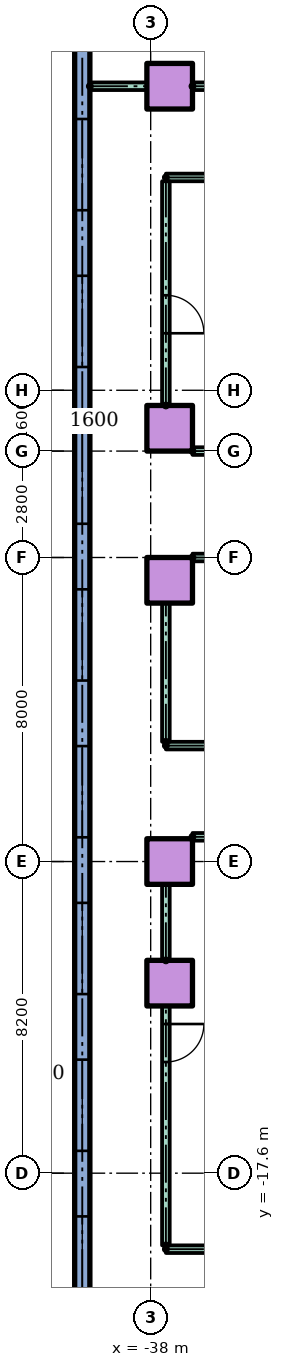
"""IFC4 building model, lengths in metres.
Left out: names, types, materials, properties, quantities, classifications, styles, units other than length and angle.
Written with IfcOpenShell. Run it as: python <this file> out.ifc"""

import sys

from ifc_helpers import new_model, si_unit, direction, frame, frame_2d, origin, origin_2d, place, context, subcontext, project, spatial, rectangle, hollow_rectangle, extrude, element, fill, save


model = new_model("IFC4")
c1 = context("Model", 3, precision=1e-05, world=origin(), true_north=direction((0.0, 1.0)))
c2 = subcontext(c1, "Body", "Model", "MODEL_VIEW")
j1 = project(units=[si_unit("LENGTHUNIT", "METRE"), si_unit("PLANEANGLEUNIT", "RADIAN")], contexts=[c1])
p1 = place(None, origin())
s1 = spatial("IfcSite", under=j1, at=p1, CompositionType="ELEMENT")
p2 = place(p1, origin())
s2 = spatial("IfcBuilding", under=s1, at=p2, CompositionType="ELEMENT")
p3 = place(p2, frame((0.0, 0.0, 6.0)))
s3 = spatial("IfcBuildingStorey", under=s2, at=p3, CompositionType="ELEMENT", Elevation=6.0)
for number, where in (
    (1, (-37.5, -12.6, 0.0)),
    (2, (-37.5, -9.4, 0.0)),
    (3, (-37.5, -2.0, 0.0)),
    (4, (-37.5, 2.0, 0.0)),
    (5, (-37.5, 11.0, 0.0)),
):
    element("IfcColumn", number, at=place(p3, frame(where)), inside=s3, PredefinedType="COLUMN", context=c2, shape_type="SweptSolid", body=[
        extrude(hollow_rectangle(XDim=1.2, YDim=1.2, WallThickness=0.06, at=origin_2d()), origin(), (0.0, 0.0, 1.0), 4.0),
    ])
p4 = place(p3, frame((-39.8, 20.0, 0.0), z_axis=(0.0, 0.0, 1.0), x_axis=(0.0, -1.0, 0.0)))
e6 = element("IfcWall", 6, at=p4, inside=s3, PredefinedType="STANDARD", context=c2, shape_type="SweptSolid", body=[
    extrude(rectangle(XDim=70.0, YDim=0.4, at=frame_2d((35.0, 0.0))), origin(), (0.0, 0.0, 1.0), 3.7),
])
p5 = place(p4, frame((1.05, 0.0, 0.9)))
e7 = element("IfcOpeningElement", 7, at=p5, cuts=e6, PredefinedType="OPENING", context=c2, shape_type="SweptSolid", body=[
    extrude(rectangle(XDim=2.4, YDim=2.1, at=frame_2d((1.2, 1.05))), frame((0.0, 0.21, 0.0), z_axis=(0.0, -1.0, 0.0), x_axis=(1.0, 0.0, 0.0)), (0.0, 0.0, 1.0), 0.42),
])
p6 = place(p4, frame((5.55, 0.0, 0.9)))
e8 = element("IfcOpeningElement", 8, at=p6, cuts=e6, PredefinedType="OPENING", context=c2, shape_type="SweptSolid", body=[
    extrude(rectangle(XDim=2.4, YDim=2.1, at=frame_2d((1.2, 1.05))), frame((0.0, 0.21, 0.0), z_axis=(0.0, -1.0, 0.0), x_axis=(1.0, 0.0, 0.0)), (0.0, 0.0, 1.0), 0.42),
])
p7 = place(p4, frame((9.863, 0.0, 0.9)))
e9 = element("IfcOpeningElement", 9, at=p7, cuts=e6, PredefinedType="OPENING", context=c2, shape_type="SweptSolid", body=[
    extrude(rectangle(XDim=2.4, YDim=2.1, at=frame_2d((1.2, 1.05))), frame((0.0, 0.21, 0.0), z_axis=(0.0, -1.0, 0.0), x_axis=(1.0, 0.0, 0.0)), (0.0, 0.0, 1.0), 0.42),
])
p8 = place(p4, frame((13.988, 0.0, 0.9)))
e10 = element("IfcOpeningElement", 10, at=p8, cuts=e6, PredefinedType="OPENING", context=c2, shape_type="SweptSolid", body=[
    extrude(rectangle(XDim=2.4, YDim=2.1, at=frame_2d((1.2, 1.05))), frame((0.0, 0.21, 0.0), z_axis=(0.0, -1.0, 0.0), x_axis=(1.0, 0.0, 0.0)), (0.0, 0.0, 1.0), 0.42),
])
p9 = place(p4, frame((18.113, 0.0, 0.9)))
e11 = element("IfcOpeningElement", 11, at=p9, cuts=e6, PredefinedType="OPENING", context=c2, shape_type="SweptSolid", body=[
    extrude(rectangle(XDim=2.4, YDim=2.1, at=frame_2d((1.2, 1.05))), frame((0.0, 0.21, 0.0), z_axis=(0.0, -1.0, 0.0), x_axis=(1.0, 0.0, 0.0)), (0.0, 0.0, 1.0), 0.42),
])
p10 = place(p4, frame((22.238, 0.0, 0.9)))
e12 = element("IfcOpeningElement", 12, at=p10, cuts=e6, PredefinedType="OPENING", context=c2, shape_type="SweptSolid", body=[
    extrude(rectangle(XDim=2.4, YDim=2.1, at=frame_2d((1.2, 1.05))), frame((0.0, 0.21, 0.0), z_axis=(0.0, -1.0, 0.0), x_axis=(1.0, 0.0, 0.0)), (0.0, 0.0, 1.0), 0.42),
])
p11 = place(p4, frame((26.363, 0.0, 0.9)))
e13 = element("IfcOpeningElement", 13, at=p11, cuts=e6, PredefinedType="OPENING", context=c2, shape_type="SweptSolid", body=[
    extrude(rectangle(XDim=2.4, YDim=2.1, at=frame_2d((1.2, 1.05))), frame((0.0, 0.21, 0.0), z_axis=(0.0, -1.0, 0.0), x_axis=(1.0, 0.0, 0.0)), (0.0, 0.0, 1.0), 0.42),
])
p12 = place(p4, frame((30.488, 0.0, 0.9)))
e14 = element("IfcOpeningElement", 14, at=p12, cuts=e6, PredefinedType="OPENING", context=c2, shape_type="SweptSolid", body=[
    extrude(rectangle(XDim=2.4, YDim=2.1, at=frame_2d((1.2, 1.05))), frame((0.0, 0.21, 0.0), z_axis=(0.0, -1.0, 0.0), x_axis=(1.0, 0.0, 0.0)), (0.0, 0.0, 1.0), 0.42),
])
p13 = place(p4, frame((34.613, 0.0, 0.9)))
e15 = element("IfcOpeningElement", 15, at=p13, cuts=e6, PredefinedType="OPENING", context=c2, shape_type="SweptSolid", body=[
    extrude(rectangle(XDim=2.4, YDim=2.1, at=frame_2d((1.2, 1.05))), frame((0.0, 0.21, 0.0), z_axis=(0.0, -1.0, 0.0), x_axis=(1.0, 0.0, 0.0)), (0.0, 0.0, 1.0), 0.42),
])
p14 = place(p4, frame((38.738, 0.0, 0.9)))
e16 = element("IfcOpeningElement", 16, at=p14, cuts=e6, PredefinedType="OPENING", context=c2, shape_type="SweptSolid", body=[
    extrude(rectangle(XDim=2.4, YDim=2.1, at=frame_2d((1.2, 1.05))), frame((0.0, 0.21, 0.0), z_axis=(0.0, -1.0, 0.0), x_axis=(1.0, 0.0, 0.0)), (0.0, 0.0, 1.0), 0.42),
])
p15 = place(p4, frame((53.633, 0.0, 0.9)))
e17 = element("IfcOpeningElement", 17, at=p15, cuts=e6, PredefinedType="OPENING", context=c2, shape_type="SweptSolid", body=[
    extrude(rectangle(XDim=2.4, YDim=2.1, at=frame_2d((1.2, 1.05))), frame((0.0, 0.21, 0.0), z_axis=(0.0, -1.0, 0.0), x_axis=(1.0, 0.0, 0.0)), (0.0, 0.0, 1.0), 0.42),
])
p16 = place(p4, frame((57.3, 0.0, 0.9)))
e18 = element("IfcOpeningElement", 18, at=p16, cuts=e6, PredefinedType="OPENING", context=c2, shape_type="SweptSolid", body=[
    extrude(rectangle(XDim=2.4, YDim=2.1, at=frame_2d((1.2, 1.05))), frame((0.0, 0.21, 0.0), z_axis=(0.0, -1.0, 0.0), x_axis=(1.0, 0.0, 0.0)), (0.0, 0.0, 1.0), 0.42),
])
p17 = place(p4, frame((60.967, 0.0, 0.9)))
e19 = element("IfcOpeningElement", 19, at=p17, cuts=e6, PredefinedType="OPENING", context=c2, shape_type="SweptSolid", body=[
    extrude(rectangle(XDim=2.4, YDim=2.1, at=frame_2d((1.2, 1.05))), frame((0.0, 0.21, 0.0), z_axis=(0.0, -1.0, 0.0), x_axis=(1.0, 0.0, 0.0)), (0.0, 0.0, 1.0), 0.42),
])
p18 = place(p4, frame((66.85, 0.0, 0.9)))
e20 = element("IfcOpeningElement", 20, at=p18, cuts=e6, PredefinedType="OPENING", context=c2, shape_type="SweptSolid", body=[
    extrude(rectangle(XDim=2.4, YDim=2.1, at=frame_2d((1.2, 1.05))), frame((0.0, 0.21, 0.0), z_axis=(0.0, -1.0, 0.0), x_axis=(1.0, 0.0, 0.0)), (0.0, 0.0, 1.0), 0.42),
])
p19 = place(p3, frame((-37.6, -19.6, 0.0)))
e21 = element("IfcWall", 21, at=p19, inside=s3, PredefinedType="PARTITIONING", context=c2, shape_type="SweptSolid", body=[
    extrude(rectangle(XDim=75.2, YDim=0.2, at=frame_2d((37.6, 0.0))), origin(), (0.0, 0.0, 1.0), 3.7),
])
p20 = place(p19, frame((14.5, 0.0, 0.0)))
e22 = element("IfcOpeningElement", 22, at=p20, cuts=e21, PredefinedType="OPENING", context=c2, shape_type="SweptSolid", body=[
    extrude(rectangle(XDim=1.0, YDim=2.1, at=frame_2d((0.5, 1.05))), frame((0.0, 0.11, 0.0), z_axis=(0.0, -1.0, 0.0), x_axis=(1.0, 0.0, 0.0)), (0.0, 0.0, 1.0), 0.22),
])
p21 = place(p19, frame((22.184, 0.0, 0.0)))
e23 = element("IfcOpeningElement", 23, at=p21, cuts=e21, PredefinedType="OPENING", context=c2, shape_type="SweptSolid", body=[
    extrude(rectangle(XDim=1.0, YDim=2.1, at=frame_2d((0.5, 1.05))), frame((0.0, 0.11, 0.0), z_axis=(0.0, -1.0, 0.0), x_axis=(1.0, 0.0, 0.0)), (0.0, 0.0, 1.0), 0.22),
])
p22 = place(p19, frame((29.016, 0.0, 0.0)))
e24 = element("IfcOpeningElement", 24, at=p22, cuts=e21, PredefinedType="OPENING", context=c2, shape_type="SweptSolid", body=[
    extrude(rectangle(XDim=1.0, YDim=2.1, at=frame_2d((0.5, 1.05))), frame((0.0, 0.11, 0.0), z_axis=(0.0, -1.0, 0.0), x_axis=(1.0, 0.0, 0.0)), (0.0, 0.0, 1.0), 0.22),
])
p23 = place(p19, frame((34.34, 0.0, 0.0)))
e25 = element("IfcOpeningElement", 25, at=p23, cuts=e21, PredefinedType="OPENING", context=c2, shape_type="SweptSolid", body=[
    extrude(rectangle(XDim=1.0, YDim=2.1, at=frame_2d((0.5, 1.05))), frame((0.0, 0.11, 0.0), z_axis=(0.0, -1.0, 0.0), x_axis=(1.0, 0.0, 0.0)), (0.0, 0.0, 1.0), 0.22),
])
p24 = place(p19, frame((41.06, 0.0, 0.0)))
e26 = element("IfcOpeningElement", 26, at=p24, cuts=e21, PredefinedType="OPENING", context=c2, shape_type="SweptSolid", body=[
    extrude(rectangle(XDim=1.0, YDim=2.1, at=frame_2d((0.5, 1.05))), frame((0.0, 0.11, 0.0), z_axis=(0.0, -1.0, 0.0), x_axis=(1.0, 0.0, 0.0)), (0.0, 0.0, 1.0), 0.22),
])
p25 = place(p19, frame((46.95, 0.0, 0.0)))
e27 = element("IfcOpeningElement", 27, at=p25, cuts=e21, PredefinedType="OPENING", context=c2, shape_type="SweptSolid", body=[
    extrude(rectangle(XDim=1.1, YDim=2.1, at=frame_2d((0.55, 1.05))), frame((0.0, 0.11, 0.0), z_axis=(0.0, -1.0, 0.0), x_axis=(1.0, 0.0, 0.0)), (0.0, 0.0, 1.0), 0.22),
])
p26 = place(p19, frame((55.35, 0.0, 0.0)))
e28 = element("IfcOpeningElement", 28, at=p26, cuts=e21, PredefinedType="OPENING", context=c2, shape_type="SweptSolid", body=[
    extrude(rectangle(XDim=1.1, YDim=2.1, at=frame_2d((0.55, 1.05))), frame((0.0, 0.11, 0.0), z_axis=(0.0, -1.0, 0.0), x_axis=(1.0, 0.0, 0.0)), (0.0, 0.0, 1.0), 0.22),
])
p27 = place(p19, frame((62.7, 0.0, 0.0)))
e29 = element("IfcOpeningElement", 29, at=p27, cuts=e21, PredefinedType="OPENING", context=c2, shape_type="SweptSolid", body=[
    extrude(rectangle(XDim=1.0, YDim=2.1, at=frame_2d((0.5, 1.05))), frame((0.0, 0.11, 0.0), z_axis=(0.0, -1.0, 0.0), x_axis=(1.0, 0.0, 0.0)), (0.0, 0.0, 1.0), 0.22),
])
p28 = place(p3, frame((-36.9, -8.75, 0.0)))
e30 = element("IfcWall", 30, at=p28, inside=s3, PredefinedType="PARTITIONING", context=c2, shape_type="SweptSolid", body=[
    extrude(rectangle(XDim=73.8, YDim=0.2, at=frame_2d((36.9, 0.0))), origin(), (0.0, 0.0, 1.0), 3.7),
])
p29 = place(p3, frame((-37.6, -6.35, 0.0)))
e31 = element("IfcWall", 31, at=p29, inside=s3, PredefinedType="PARTITIONING", context=c2, shape_type="SweptSolid", body=[
    extrude(rectangle(XDim=75.2, YDim=0.2, at=frame_2d((37.6, 0.0))), origin(), (0.0, 0.0, 1.0), 3.7),
])
p30 = place(p29, frame((4.0, 0.0, 0.0)))
e32 = element("IfcOpeningElement", 32, at=p30, cuts=e31, PredefinedType="OPENING", context=c2, shape_type="SweptSolid", body=[
    extrude(rectangle(XDim=1.0, YDim=2.1, at=frame_2d((0.5, 1.05))), frame((0.0, 0.11, 0.0), z_axis=(0.0, -1.0, 0.0), x_axis=(1.0, 0.0, 0.0)), (0.0, 0.0, 1.0), 0.22),
])
p31 = place(p29, frame((13.0, 0.0, 0.0)))
e33 = element("IfcOpeningElement", 33, at=p31, cuts=e31, PredefinedType="OPENING", context=c2, shape_type="SweptSolid", body=[
    extrude(rectangle(XDim=1.0, YDim=2.1, at=frame_2d((0.5, 1.05))), frame((0.0, 0.11, 0.0), z_axis=(0.0, -1.0, 0.0), x_axis=(1.0, 0.0, 0.0)), (0.0, 0.0, 1.0), 0.22),
])
p32 = place(p29, frame((21.55, 0.0, 0.0)))
e34 = element("IfcOpeningElement", 34, at=p32, cuts=e31, PredefinedType="OPENING", context=c2, shape_type="SweptSolid", body=[
    extrude(rectangle(XDim=0.9, YDim=2.1, at=frame_2d((0.45, 1.05))), frame((0.0, 0.11, 0.0), z_axis=(0.0, -1.0, 0.0), x_axis=(1.0, 0.0, 0.0)), (0.0, 0.0, 1.0), 0.22),
])
p33 = place(p29, frame((31.5, 0.0, 0.0)))
e35 = element("IfcOpeningElement", 35, at=p33, cuts=e31, PredefinedType="OPENING", context=c2, shape_type="SweptSolid", body=[
    extrude(rectangle(XDim=1.0, YDim=2.1, at=frame_2d((0.5, 1.05))), frame((0.0, 0.11, 0.0), z_axis=(0.0, -1.0, 0.0), x_axis=(1.0, 0.0, 0.0)), (0.0, 0.0, 1.0), 0.22),
])
p34 = place(p29, frame((43.5, 0.0, 0.0)))
e36 = element("IfcOpeningElement", 36, at=p34, cuts=e31, PredefinedType="OPENING", context=c2, shape_type="SweptSolid", body=[
    extrude(rectangle(XDim=1.0, YDim=2.1, at=frame_2d((0.5, 1.05))), frame((0.0, 0.11, 0.0), z_axis=(0.0, -1.0, 0.0), x_axis=(1.0, 0.0, 0.0)), (0.0, 0.0, 1.0), 0.22),
])
p35 = place(p29, frame((62.1, 0.0, 0.0)))
e37 = element("IfcOpeningElement", 37, at=p35, cuts=e31, PredefinedType="OPENING", context=c2, shape_type="SweptSolid", body=[
    extrude(rectangle(XDim=1.0, YDim=2.1, at=frame_2d((0.5, 1.05))), frame((0.0, 0.11, 0.0), z_axis=(0.0, -1.0, 0.0), x_axis=(1.0, 0.0, 0.0)), (0.0, 0.0, 1.0), 0.22),
])
p36 = place(p3, frame((-36.9, -1.4, 0.0)))
e38 = element("IfcWall", 38, at=p36, inside=s3, PredefinedType="PARTITIONING", context=c2, shape_type="SweptSolid", body=[
    extrude(rectangle(XDim=22.9, YDim=0.2, at=frame_2d((11.45, 0.0))), origin(), (0.0, 0.0, 1.0), 3.7),
])
p37 = place(p3, frame((-36.9, 1.4, 0.0)))
e39 = element("IfcWall", 39, at=p37, inside=s3, PredefinedType="PARTITIONING", context=c2, shape_type="SweptSolid", body=[
    extrude(rectangle(XDim=20.6, YDim=0.2, at=frame_2d((10.3, 0.0))), origin(), (0.0, 0.0, 1.0), 3.7),
])
p38 = place(p37, frame((7.9, 0.0, 0.0)))
e40 = element("IfcOpeningElement", 40, at=p38, cuts=e39, PredefinedType="OPENING", context=c2, shape_type="SweptSolid", body=[
    extrude(rectangle(XDim=1.0, YDim=2.1, at=frame_2d((0.5, 1.05))), frame((0.0, 0.11, 0.0), z_axis=(0.0, -1.0, 0.0), x_axis=(1.0, 0.0, 0.0)), (0.0, 0.0, 1.0), 0.22),
])
p39 = place(p37, frame((12.9, 0.0, 0.0)))
e41 = element("IfcOpeningElement", 41, at=p39, cuts=e39, PredefinedType="OPENING", context=c2, shape_type="SweptSolid", body=[
    extrude(rectangle(XDim=1.0, YDim=2.1, at=frame_2d((0.5, 1.05))), frame((0.0, 0.11, 0.0), z_axis=(0.0, -1.0, 0.0), x_axis=(1.0, 0.0, 0.0)), (0.0, 0.0, 1.0), 0.22),
])
p40 = place(p37, frame((16.6, 0.0, 0.0)))
e42 = element("IfcOpeningElement", 42, at=p40, cuts=e39, PredefinedType="OPENING", context=c2, shape_type="SweptSolid", body=[
    extrude(rectangle(XDim=1.0, YDim=2.1, at=frame_2d((0.5, 1.05))), frame((0.0, 0.11, 0.0), z_axis=(0.0, -1.0, 0.0), x_axis=(1.0, 0.0, 0.0)), (0.0, 0.0, 1.0), 0.22),
])
p41 = place(p37, frame((18.95, 0.0, 0.0)))
e43 = element("IfcOpeningElement", 43, at=p41, cuts=e39, PredefinedType="OPENING", context=c2, shape_type="SweptSolid", body=[
    extrude(rectangle(XDim=0.9, YDim=2.1, at=frame_2d((0.45, 1.05))), frame((0.0, 0.11, 0.0), z_axis=(0.0, -1.0, 0.0), x_axis=(1.0, 0.0, 0.0)), (0.0, 0.0, 1.0), 0.22),
])
p42 = place(p3, frame((-37.6, 8.6, 0.0)))
e44 = element("IfcWall", 44, at=p42, inside=s3, PredefinedType="PARTITIONING", context=c2, shape_type="SweptSolid", body=[
    extrude(rectangle(XDim=21.3, YDim=0.2, at=frame_2d((10.65, 0.0))), origin(), (0.0, 0.0, 1.0), 3.7),
])
p43 = place(p3, frame((-39.6, 11.0, 0.0)))
e45 = element("IfcWall", 45, at=p43, inside=s3, PredefinedType="PARTITIONING", context=c2, shape_type="SweptSolid", body=[
    extrude(rectangle(XDim=1.5, YDim=0.2, at=frame_2d((0.75, 0.0))), origin(), (0.0, 0.0, 1.0), 3.7),
])
p44 = place(p3, frame((-36.9, 11.0, 0.0)))
e46 = element("IfcWall", 46, at=p44, inside=s3, PredefinedType="PARTITIONING", context=c2, shape_type="SweptSolid", body=[
    extrude(rectangle(XDim=6.4, YDim=0.2, at=frame_2d((3.2, 0.0))), origin(), (0.0, 0.0, 1.0), 3.7),
])
p45 = place(p44, frame((1.792, 0.0, 0.0)))
e47 = element("IfcOpeningElement", 47, at=p45, cuts=e46, PredefinedType="OPENING", context=c2, shape_type="SweptSolid", body=[
    extrude(rectangle(XDim=1.0, YDim=2.1, at=frame_2d((0.5, 1.05))), frame((0.0, 0.11, 0.0), z_axis=(0.0, -1.0, 0.0), x_axis=(1.0, 0.0, 0.0)), (0.0, 0.0, 1.0), 0.22),
])
p46 = place(p44, frame((5.05, 0.0, 0.0)))
e48 = element("IfcOpeningElement", 48, at=p46, cuts=e46, PredefinedType="OPENING", context=c2, shape_type="SweptSolid", body=[
    extrude(rectangle(XDim=1.0, YDim=2.1, at=frame_2d((0.5, 1.05))), frame((0.0, 0.11, 0.0), z_axis=(0.0, -1.0, 0.0), x_axis=(1.0, 0.0, 0.0)), (0.0, 0.0, 1.0), 0.22),
])
p47 = place(p3, frame((-37.6, -19.5, 0.0), z_axis=(0.0, 0.0, 1.0), x_axis=(0.0, 1.0, 0.0)))
e49 = element("IfcWall", 49, at=p47, inside=s3, PredefinedType="PARTITIONING", context=c2, shape_type="SweptSolid", body=[
    extrude(rectangle(XDim=6.3, YDim=0.2, at=frame_2d((3.15, 0.0))), origin(), (0.0, 0.0, 1.0), 3.7),
])
p48 = place(p47, frame((4.825, 0.0, 0.0)))
e50 = element("IfcOpeningElement", 50, at=p48, cuts=e49, PredefinedType="OPENING", context=c2, shape_type="SweptSolid", body=[
    extrude(rectangle(XDim=1.0, YDim=2.1, at=frame_2d((0.5, 1.05))), frame((0.0, 0.11, 0.0), z_axis=(0.0, -1.0, 0.0), x_axis=(1.0, 0.0, 0.0)), (0.0, 0.0, 1.0), 0.22),
])
p49 = place(p3, frame((-37.6, -12.0, 0.0), z_axis=(0.0, 0.0, 1.0), x_axis=(0.0, 1.0, 0.0)))
e51 = element("IfcWall", 51, at=p49, inside=s3, PredefinedType="PARTITIONING", context=c2, shape_type="SweptSolid", body=[
    extrude(rectangle(XDim=2.0, YDim=0.2, at=frame_2d((1.0, 0.0))), origin(), (0.0, 0.0, 1.0), 3.7),
])
p50 = place(p3, frame((-37.6, -6.25, 0.0), z_axis=(0.0, 0.0, 1.0), x_axis=(0.0, 1.0, 0.0)))
e52 = element("IfcWall", 52, at=p50, inside=s3, PredefinedType="PARTITIONING", context=c2, shape_type="SweptSolid", body=[
    extrude(rectangle(XDim=3.65, YDim=0.2, at=frame_2d((1.825, 0.0))), origin(), (0.0, 0.0, 1.0), 3.7),
])
p51 = place(p3, frame((-37.6, 2.6, 0.0), z_axis=(0.0, 0.0, 1.0), x_axis=(0.0, 1.0, 0.0)))
e53 = element("IfcWall", 53, at=p51, inside=s3, PredefinedType="PARTITIONING", context=c2, shape_type="SweptSolid", body=[
    extrude(rectangle(XDim=5.9, YDim=0.2, at=frame_2d((2.95, 0.0))), origin(), (0.0, 0.0, 1.0), 3.7),
])
p52 = place(p51, frame((1.9, 0.0, 0.0)))
e54 = element("IfcOpeningElement", 54, at=p52, cuts=e53, PredefinedType="OPENING", context=c2, shape_type="SweptSolid", body=[
    extrude(rectangle(XDim=1.0, YDim=2.1, at=frame_2d((0.5, 1.05))), frame((0.0, 0.11, 0.0), z_axis=(0.0, -1.0, 0.0), x_axis=(1.0, 0.0, 0.0)), (0.0, 0.0, 1.0), 0.22),
])
p53 = place(p7, origin())
e55 = element("IfcWindow", 55, at=p53, inside=s3, PartitioningType="SINGLE_PANEL", PredefinedType="WINDOW", context=c2, shape_type="SweptSolid", body=[
    extrude(rectangle(XDim=2.4, YDim=2.1, at=frame_2d((1.2, 1.05))), frame((0.0, 0.03, 0.0), z_axis=(0.0, -1.0, 0.0), x_axis=(1.0, 0.0, 0.0)), (0.0, 0.0, 1.0), 0.06),
])
fill(e9, e55)
p54 = place(p8, origin())
e56 = element("IfcWindow", 56, at=p54, inside=s3, PartitioningType="SINGLE_PANEL", PredefinedType="WINDOW", context=c2, shape_type="SweptSolid", body=[
    extrude(rectangle(XDim=2.4, YDim=2.1, at=frame_2d((1.2, 1.05))), frame((0.0, 0.03, 0.0), z_axis=(0.0, -1.0, 0.0), x_axis=(1.0, 0.0, 0.0)), (0.0, 0.0, 1.0), 0.06),
])
fill(e10, e56)
p55 = place(p9, origin())
e57 = element("IfcWindow", 57, at=p55, inside=s3, PartitioningType="SINGLE_PANEL", PredefinedType="WINDOW", context=c2, shape_type="SweptSolid", body=[
    extrude(rectangle(XDim=2.4, YDim=2.1, at=frame_2d((1.2, 1.05))), frame((0.0, 0.03, 0.0), z_axis=(0.0, -1.0, 0.0), x_axis=(1.0, 0.0, 0.0)), (0.0, 0.0, 1.0), 0.06),
])
fill(e11, e57)
p56 = place(p10, origin())
e58 = element("IfcWindow", 58, at=p56, inside=s3, PartitioningType="SINGLE_PANEL", PredefinedType="WINDOW", context=c2, shape_type="SweptSolid", body=[
    extrude(rectangle(XDim=2.4, YDim=2.1, at=frame_2d((1.2, 1.05))), frame((0.0, 0.03, 0.0), z_axis=(0.0, -1.0, 0.0), x_axis=(1.0, 0.0, 0.0)), (0.0, 0.0, 1.0), 0.06),
])
fill(e12, e58)
p57 = place(p11, origin())
e59 = element("IfcWindow", 59, at=p57, inside=s3, PartitioningType="SINGLE_PANEL", PredefinedType="WINDOW", context=c2, shape_type="SweptSolid", body=[
    extrude(rectangle(XDim=2.4, YDim=2.1, at=frame_2d((1.2, 1.05))), frame((0.0, 0.03, 0.0), z_axis=(0.0, -1.0, 0.0), x_axis=(1.0, 0.0, 0.0)), (0.0, 0.0, 1.0), 0.06),
])
fill(e13, e59)
p58 = place(p12, origin())
e60 = element("IfcWindow", 60, at=p58, inside=s3, PartitioningType="SINGLE_PANEL", PredefinedType="WINDOW", context=c2, shape_type="SweptSolid", body=[
    extrude(rectangle(XDim=2.4, YDim=2.1, at=frame_2d((1.2, 1.05))), frame((0.0, 0.03, 0.0), z_axis=(0.0, -1.0, 0.0), x_axis=(1.0, 0.0, 0.0)), (0.0, 0.0, 1.0), 0.06),
])
fill(e14, e60)
p59 = place(p13, origin())
e61 = element("IfcWindow", 61, at=p59, inside=s3, PartitioningType="SINGLE_PANEL", PredefinedType="WINDOW", context=c2, shape_type="SweptSolid", body=[
    extrude(rectangle(XDim=2.4, YDim=2.1, at=frame_2d((1.2, 1.05))), frame((0.0, 0.03, 0.0), z_axis=(0.0, -1.0, 0.0), x_axis=(1.0, 0.0, 0.0)), (0.0, 0.0, 1.0), 0.06),
])
fill(e15, e61)
p60 = place(p14, origin())
e62 = element("IfcWindow", 62, at=p60, inside=s3, PartitioningType="SINGLE_PANEL", PredefinedType="WINDOW", context=c2, shape_type="SweptSolid", body=[
    extrude(rectangle(XDim=2.4, YDim=2.1, at=frame_2d((1.2, 1.05))), frame((0.0, 0.03, 0.0), z_axis=(0.0, -1.0, 0.0), x_axis=(1.0, 0.0, 0.0)), (0.0, 0.0, 1.0), 0.06),
])
fill(e16, e62)
p61 = place(p48, frame((1.0, 0.0, 0.0), z_axis=(0.0, 0.0, 1.0), x_axis=(-1.0, 0.0, 0.0)))
e63 = element("IfcDoor", 63, at=p61, inside=s3, OperationType="SINGLE_SWING_RIGHT", PredefinedType="DOOR", context=c2, shape_type="SweptSolid", body=[
    extrude(rectangle(XDim=1.0, YDim=2.1, at=frame_2d((0.5, 1.05))), frame((0.0, 0.025, 0.0), z_axis=(0.0, -1.0, 0.0), x_axis=(1.0, 0.0, 0.0)), (0.0, 0.0, 1.0), 0.05),
])
fill(e50, e63)
p62 = place(p52, frame((1.0, 0.0, 0.0), z_axis=(0.0, 0.0, 1.0), x_axis=(-1.0, 0.0, 0.0)))
e64 = element("IfcDoor", 64, at=p62, inside=s3, OperationType="SINGLE_SWING_LEFT", PredefinedType="DOOR", context=c2, shape_type="SweptSolid", body=[
    extrude(rectangle(XDim=1.0, YDim=2.1, at=frame_2d((0.5, 1.05))), frame((0.0, 0.025, 0.0), z_axis=(0.0, -1.0, 0.0), x_axis=(1.0, 0.0, 0.0)), (0.0, 0.0, 1.0), 0.05),
])
fill(e54, e64)
save(model, sys.argv[1])
